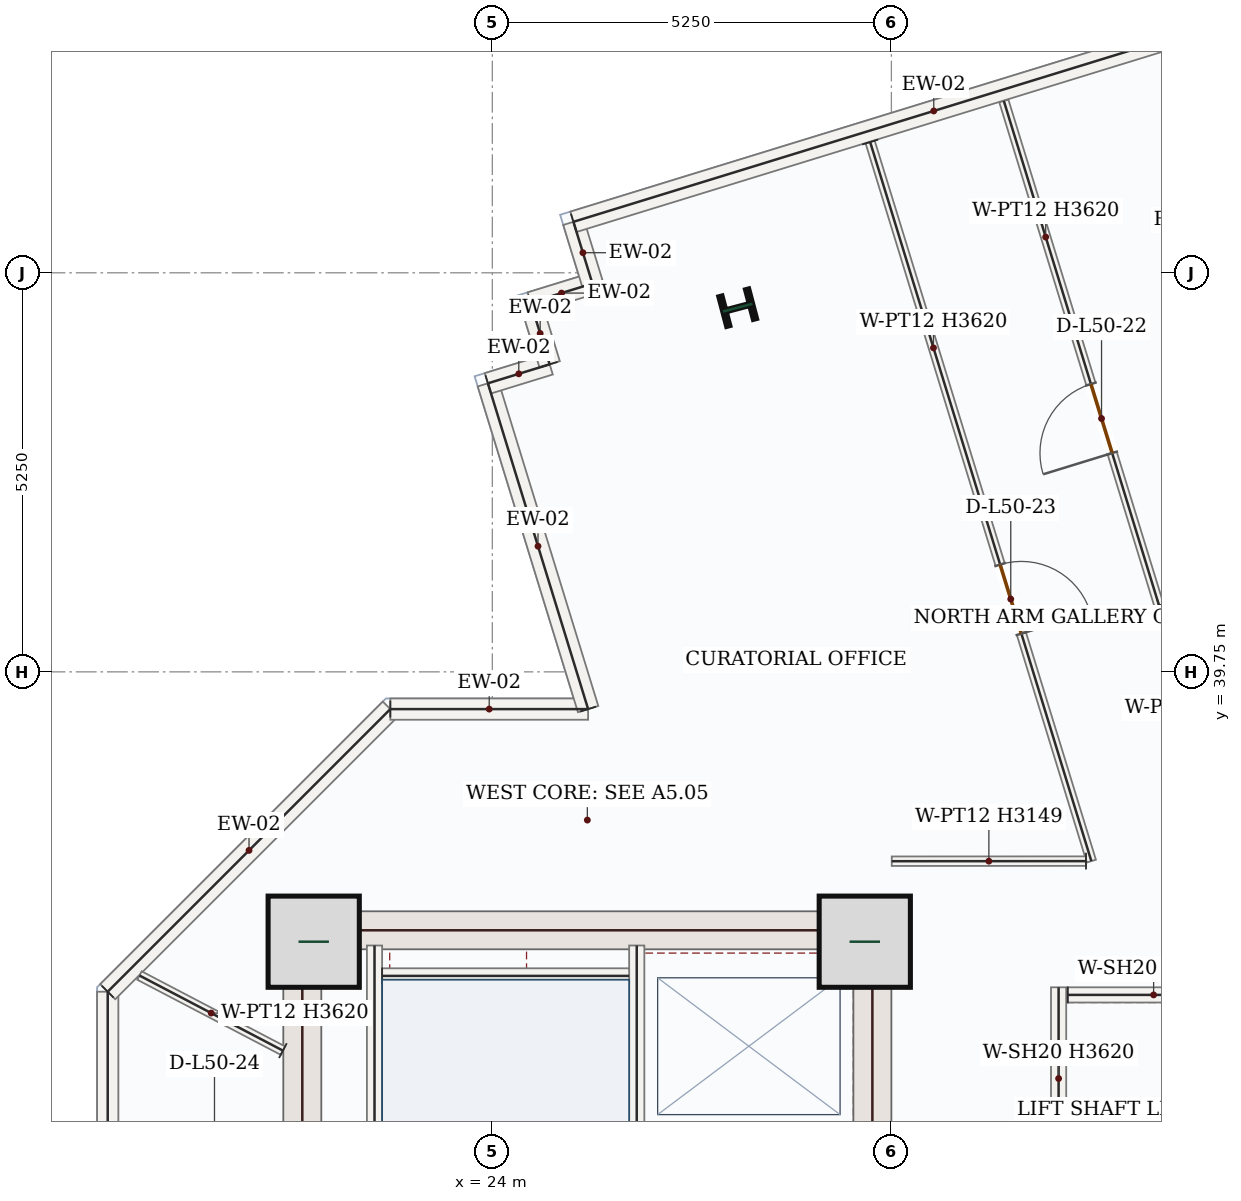
"""IFC4 building model, lengths in metres.
Left out: names, types, materials, properties, quantities, classifications, styles, units other than length and angle.
Written with IfcOpenShell. Run it as: python <this file> out.ifc"""

import sys

from ifc_helpers import new_model, si_unit, direction, frame, frame_2d, origin, origin_2d, place, context, subcontext, project, spatial, rectangle, i_section, extrude, source, transform, mapped, element, fill, save


model = new_model("IFC4")
c1 = context("Model", 3, precision=1e-05, world=origin(), true_north=direction((0.0, 1.0)))
c2 = subcontext(c1, "Body", "Model", "MODEL_VIEW")
j1 = project(units=[si_unit("LENGTHUNIT", "METRE"), si_unit("PLANEANGLEUNIT", "RADIAN")], contexts=[c1])
p1 = place(None, origin())
s1 = spatial("IfcSite", under=j1, at=p1, CompositionType="ELEMENT")
p2 = place(p1, origin())
s2 = spatial("IfcBuilding", under=s1, at=p2, CompositionType="ELEMENT")
p3 = place(p2, frame((0.0, 0.0, 213.6)))
s3 = spatial("IfcBuildingStorey", under=s2, at=p3, CompositionType="ELEMENT", Elevation=213.6)
m1 = source(origin(), c2, "Body", "SweptSolid", [
    extrude(rectangle(XDim=8.55, YDim=0.5, at=frame_2d((4.275, 0.0))), origin(), (0.0, 0.0, 1.0), 3.62),
])
p4 = place(p3, frame((21.5, 28.05, 0.0), z_axis=(0.0, 0.0, 1.0), x_axis=(0.0, 1.0, 0.0)))
e1 = element("IfcWall", 1, at=p4, inside=s3, PredefinedType="SHEAR", context=c2, shape_type="MappedRepresentation", body=[
    mapped(m1, transform((0.0, 0.0, 0.0), x_axis=(1.0, 0.0, 0.0), y_axis=(0.0, 1.0, 0.0), z_axis=(0.0, 0.0, 1.0), scale=1.0)),
])
p5 = place(p3, frame((29.0, 28.05, 0.0), z_axis=(0.0, 0.0, 1.0), x_axis=(0.0, 1.0, 0.0)))
e2 = element("IfcWall", 2, at=p5, inside=s3, PredefinedType="SHEAR", context=c2, shape_type="SweptSolid", body=[
    extrude(rectangle(XDim=8.55, YDim=0.5, at=frame_2d((4.275, 0.0))), origin(), (0.0, 0.0, 1.0), 3.62),
])
p6 = place(p5, frame((1.5, 0.0, 0.0)))
e3 = element("IfcOpeningElement", 3, at=p6, cuts=e2, PredefinedType="OPENING", context=c2, shape_type="SweptSolid", body=[
    extrude(rectangle(XDim=1.1, YDim=2.2, at=frame_2d((0.55, 1.1))), frame((0.0, 0.26, 0.0), z_axis=(0.0, -1.0, 0.0), x_axis=(1.0, 0.0, 0.0)), (0.0, 0.0, 1.0), 0.52),
])
m2 = source(origin(), c2, "Body", "SweptSolid", [
    extrude(rectangle(XDim=7.0, YDim=0.5, at=frame_2d((3.5, 0.0))), origin(), (0.0, 0.0, 1.0), 3.62),
])
p7 = place(p3, frame((21.75, 36.35, 0.0), z_axis=(0.0, 0.0, 1.0), x_axis=(1.0, 0.0, 0.0)))
e4 = element("IfcWall", 4, at=p7, inside=s3, PredefinedType="SHEAR", context=c2, shape_type="MappedRepresentation", body=[
    mapped(m2, transform((0.0, 0.0, 0.0), x_axis=(1.0, 0.0, 0.0), y_axis=(0.0, 1.0, 0.0), z_axis=(0.0, 0.0, 1.0), scale=1.0)),
])
m3 = source(origin(), c2, "Body", "SweptSolid", [
    extrude(rectangle(XDim=1.2, YDim=1.2, at=origin_2d()), origin(), (0.0, 0.0, 1.0), 3.9),
])
for number, where, z_axis, x_axis in (
    (5, (21.65, 36.2, 0.0), (0.0, 0.0, 1.0), (1.0, 0.0, 0.0)),
    (6, (28.9, 36.2, 0.0), (0.0, 0.0, 1.0), (1.0, 0.0, 0.0)),
):
    element("IfcColumn", number, at=place(p3, frame(where, z_axis=z_axis, x_axis=x_axis)), inside=s3, PredefinedType="COLUMN", context=c2, shape_type="MappedRepresentation", body=[
        mapped(m3, transform((0.0, 0.0, 0.0), x_axis=(1.0, 0.0, 0.0), y_axis=(0.0, 1.0, 0.0), z_axis=(0.0, 0.0, 1.0), scale=1.0)),
    ])
m4 = source(origin(), c2, "Body", "SweptSolid", [
    extrude(i_section(OverallWidth=0.404, OverallDepth=0.407, WebThickness=0.027, FlangeThickness=0.044, FilletRadius=0.018, at=origin_2d()), origin(), (0.0, 0.0, 1.0), 3.9),
])
p8 = place(p3, frame((27.228, 44.541, 0.0), z_axis=(0.0, 0.0, 1.0), x_axis=(-0.255445757936, 0.966823388604, 0.0)))
e7 = element("IfcColumn", 7, at=p8, inside=s3, PredefinedType="COLUMN", context=c2, shape_type="MappedRepresentation", body=[
    mapped(m4, transform((0.0, 0.0, 0.0), x_axis=(1.0, 0.0, 0.0), y_axis=(0.0, 1.0, 0.0), z_axis=(0.0, 0.0, 1.0), scale=1.0)),
])
m5 = source(origin(), c2, "Body", "SweptSolid", [
    extrude(rectangle(XDim=6.822, YDim=0.28, at=frame_2d((3.411, 0.0))), origin(), (0.0, 0.0, 1.0), 3.62),
])
p9 = place(p3, frame((18.94, 28.72, 0.0), z_axis=(0.0, 0.0, 1.0), x_axis=(0.0, 1.0, 0.0)))
e8 = element("IfcWall", 8, at=p9, inside=s3, PredefinedType="SOLIDWALL", context=c2, shape_type="MappedRepresentation", body=[
    mapped(m5, transform((0.0, 0.0, 0.0), x_axis=(1.0, 0.0, 0.0), y_axis=(0.0, 1.0, 0.0), z_axis=(0.0, 0.0, 1.0), scale=1.0)),
])
m6 = source(origin(), c2, "Body", "SweptSolid", [
    extrude(rectangle(XDim=5.258, YDim=0.28, at=frame_2d((2.629, 0.0))), origin(), (0.0, 0.0, 1.0), 3.62),
])
p10 = place(p3, frame((18.94, 35.542, 0.0), z_axis=(0.0, 0.0, 1.0), x_axis=(0.707106781187, 0.707106781187, 0.0)))
e9 = element("IfcWall", 9, at=p10, inside=s3, PredefinedType="SOLIDWALL", context=c2, shape_type="MappedRepresentation", body=[
    mapped(m6, transform((0.0, 0.0, 0.0), x_axis=(1.0, 0.0, 0.0), y_axis=(0.0, 1.0, 0.0), z_axis=(0.0, 0.0, 1.0), scale=1.0)),
])
m7 = source(origin(), c2, "Body", "SweptSolid", [
    extrude(rectangle(XDim=2.602, YDim=0.28, at=frame_2d((1.301, 0.0))), origin(), (0.0, 0.0, 1.0), 3.62),
])
p11 = place(p3, frame((22.658, 39.26, 0.0), z_axis=(0.0, 0.0, 1.0), x_axis=(1.0, 0.0, 0.0)))
e10 = element("IfcWall", 10, at=p11, inside=s3, PredefinedType="SOLIDWALL", context=c2, shape_type="MappedRepresentation", body=[
    mapped(m7, transform((0.0, 0.0, 0.0), x_axis=(1.0, 0.0, 0.0), y_axis=(0.0, 1.0, 0.0), z_axis=(0.0, 0.0, 1.0), scale=1.0)),
])
m8 = source(origin(), c2, "Body", "SweptSolid", [
    extrude(rectangle(XDim=4.484, YDim=0.28, at=frame_2d((2.242, 0.0))), origin(), (0.0, 0.0, 1.0), 3.62),
])
p12 = place(p3, frame((25.26, 39.26, 0.0), z_axis=(0.0, 0.0, 1.0), x_axis=(-0.294009328951, 0.95580254995, 0.0)))
e11 = element("IfcWall", 11, at=p12, inside=s3, PredefinedType="SOLIDWALL", context=c2, shape_type="MappedRepresentation", body=[
    mapped(m8, transform((0.0, 0.0, 0.0), x_axis=(1.0, 0.0, 0.0), y_axis=(0.0, 1.0, 0.0), z_axis=(0.0, 0.0, 1.0), scale=1.0)),
])
m9 = source(origin(), c2, "Body", "SweptSolid", [
    extrude(rectangle(XDim=0.85, YDim=0.28, at=frame_2d((0.425, 0.0))), origin(), (0.0, 0.0, 1.0), 3.62),
])
p13 = place(p3, frame((23.942, 43.546, 0.0), z_axis=(0.0, 0.0, 1.0), x_axis=(0.955834897765, 0.293904148005, 0.0)))
e12 = element("IfcWall", 12, at=p13, inside=s3, PredefinedType="SOLIDWALL", context=c2, shape_type="MappedRepresentation", body=[
    mapped(m9, transform((0.0, 0.0, 0.0), x_axis=(1.0, 0.0, 0.0), y_axis=(0.0, 1.0, 0.0), z_axis=(0.0, 0.0, 1.0), scale=1.0)),
])
m10 = source(origin(), c2, "Body", "SweptSolid", [
    extrude(rectangle(XDim=0.85, YDim=0.28, at=frame_2d((0.425, 0.0))), origin(), (0.0, 0.0, 1.0), 3.62),
])
p14 = place(p3, frame((24.754, 43.796, 0.0), z_axis=(0.0, 0.0, 1.0), x_axis=(-0.293823460726, 0.955859704102, 0.0)))
e13 = element("IfcWall", 13, at=p14, inside=s3, PredefinedType="SOLIDWALL", context=c2, shape_type="MappedRepresentation", body=[
    mapped(m10, transform((0.0, 0.0, 0.0), x_axis=(1.0, 0.0, 0.0), y_axis=(0.0, 1.0, 0.0), z_axis=(0.0, 0.0, 1.0), scale=1.0)),
])
p15 = place(p3, frame((24.504, 44.608, 0.0), z_axis=(0.0, 0.0, 1.0), x_axis=(0.95575416016, 0.294166594531, 0.0)))
e14 = element("IfcWall", 14, at=p15, inside=s3, PredefinedType="SOLIDWALL", context=c2, shape_type="MappedRepresentation", body=[
    mapped(m9, transform((0.0, 0.0, 0.0), x_axis=(1.0, 0.0, 0.0), y_axis=(0.0, 1.0, 0.0), z_axis=(0.0, 0.0, 1.0), scale=1.0)),
])
p16 = place(p3, frame((25.317, 44.858, 0.0), z_axis=(0.0, 0.0, 1.0), x_axis=(-0.293823460726, 0.955859704102, 0.0)))
e15 = element("IfcWall", 15, at=p16, inside=s3, PredefinedType="SOLIDWALL", context=c2, shape_type="MappedRepresentation", body=[
    mapped(m10, transform((0.0, 0.0, 0.0), x_axis=(1.0, 0.0, 0.0), y_axis=(0.0, 1.0, 0.0), z_axis=(0.0, 0.0, 1.0), scale=1.0)),
])
m11 = source(origin(), c2, "Body", "SweptSolid", [
    extrude(rectangle(XDim=9.92, YDim=0.28, at=frame_2d((4.96, 0.0))), origin(), (0.0, 0.0, 1.0), 3.62),
])
p17 = place(p3, frame((25.067, 45.671, 0.0), z_axis=(0.0, 0.0, 1.0), x_axis=(0.955796567368, 0.294028777175, 0.0)))
e16 = element("IfcWall", 16, at=p17, inside=s3, PredefinedType="SOLIDWALL", context=c2, shape_type="MappedRepresentation", body=[
    mapped(m11, transform((0.0, 0.0, 0.0), x_axis=(1.0, 0.0, 0.0), y_axis=(0.0, 1.0, 0.0), z_axis=(0.0, 0.0, 1.0), scale=1.0)),
])
m12 = source(origin(), c2, "Body", "SweptSolid", [
    extrude(rectangle(XDim=7.87, YDim=0.2, at=frame_2d((3.935, 0.0))), origin(), (0.0, 0.0, 1.0), 3.62),
])
p18 = place(p3, frame((22.45, 28.28, 0.0), z_axis=(0.0, 0.0, 1.0), x_axis=(0.0, 1.0, 0.0)))
e17 = element("IfcWall", 17, at=p18, inside=s3, PredefinedType="SOLIDWALL", context=c2, shape_type="MappedRepresentation", body=[
    mapped(m12, transform((0.0, 0.0, 0.0), x_axis=(1.0, 0.0, 0.0), y_axis=(0.0, 1.0, 0.0), z_axis=(0.0, 0.0, 1.0), scale=1.0)),
])
p19 = place(p3, frame((25.9, 28.15, 0.0), z_axis=(0.0, 0.0, 1.0), x_axis=(0.0, 1.0, 0.0)))
e18 = element("IfcWall", 18, at=p19, inside=s3, PredefinedType="SOLIDWALL", context=c2, shape_type="SweptSolid", body=[
    extrude(rectangle(XDim=8.0, YDim=0.2, at=frame_2d((4.0, 0.0))), origin(), (0.0, 0.0, 1.0), 3.62),
])
p20 = place(p19, frame((0.4, 0.0, 0.0)))
e19 = element("IfcOpeningElement", 19, at=p20, cuts=e18, PredefinedType="OPENING", context=c2, shape_type="SweptSolid", body=[
    extrude(rectangle(XDim=1.05, YDim=2.15, at=frame_2d((0.525, 1.075))), frame((0.0, 0.11, 0.0), z_axis=(0.0, -1.0, 0.0), x_axis=(1.0, 0.0, 0.0)), (0.0, 0.0, 1.0), 0.22),
])
m13 = source(origin(), c2, "Body", "SweptSolid", [
    extrude(rectangle(XDim=3.25, YDim=0.2, at=frame_2d((1.625, 0.0))), origin(), (0.0, 0.0, 1.0), 3.62),
])
p21 = place(p3, frame((22.55, 35.75, 0.0), z_axis=(0.0, 0.0, 1.0), x_axis=(1.0, 0.0, 0.0)))
e20 = element("IfcWall", 20, at=p21, inside=s3, PredefinedType="SOLIDWALL", context=c2, shape_type="MappedRepresentation", body=[
    mapped(m13, transform((0.0, 0.0, 0.0), x_axis=(1.0, 0.0, 0.0), y_axis=(0.0, 1.0, 0.0), z_axis=(0.0, 0.0, 1.0), scale=1.0)),
])
m14 = source(origin(), c2, "Body", "SweptSolid", [
    extrude(rectangle(XDim=2.4, YDim=0.2, at=frame_2d((1.2, 0.0))), origin(), (0.0, 0.0, 1.0), 3.62),
])
p22 = place(p3, frame((31.45, 33.2, 0.0), z_axis=(0.0, 0.0, 1.0), x_axis=(0.0, 1.0, 0.0)))
e21 = element("IfcWall", 21, at=p22, inside=s3, PredefinedType="SOLIDWALL", context=c2, shape_type="MappedRepresentation", body=[
    mapped(m14, transform((0.0, 0.0, 0.0), x_axis=(1.0, 0.0, 0.0), y_axis=(0.0, 1.0, 0.0), z_axis=(0.0, 0.0, 1.0), scale=1.0)),
])
m15 = source(origin(), c2, "Body", "SweptSolid", [
    extrude(rectangle(XDim=2.26, YDim=0.2, at=frame_2d((1.13, 0.0))), origin(), (0.0, 0.0, 1.0), 3.62),
])
p23 = place(p3, frame((31.57, 35.5, 0.0), z_axis=(0.0, 0.0, 1.0), x_axis=(1.0, 0.0, 0.0)))
e22 = element("IfcWall", 22, at=p23, inside=s3, PredefinedType="SOLIDWALL", context=c2, shape_type="MappedRepresentation", body=[
    mapped(m15, transform((0.0, 0.0, 0.0), x_axis=(1.0, 0.0, 0.0), y_axis=(0.0, 1.0, 0.0), z_axis=(0.0, 0.0, 1.0), scale=1.0)),
])
m16 = source(origin(), c2, "Body", "SweptSolid", [
    extrude(rectangle(XDim=3.498, YDim=0.125, at=frame_2d((1.749, 0.0))), origin(), (0.0, 0.0, 1.0), 3.62),
])
p24 = place(p3, frame((33.806, 37.26, 0.0), z_axis=(0.0, 0.0, 1.0), x_axis=(-0.294012288782, 0.955801639487, 0.0)))
e23 = element("IfcWall", 23, at=p24, inside=s3, PredefinedType="PARTITIONING", context=c2, shape_type="MappedRepresentation", body=[
    mapped(m16, transform((0.0, 0.0, 0.0), x_axis=(1.0, 0.0, 0.0), y_axis=(0.0, 1.0, 0.0), z_axis=(0.0, 0.0, 1.0), scale=1.0)),
])
m17 = source(origin(), c2, "Body", "SweptSolid", [
    extrude(rectangle(XDim=5.595, YDim=0.125, at=frame_2d((2.797, 0.0))), origin(), (0.0, 0.0, 1.0), 3.62),
])
p25 = place(p3, frame((32.778, 40.604, 0.0), z_axis=(0.0, 0.0, 1.0), x_axis=(0.955787499516, 0.294058252339, 0.0)))
e24 = element("IfcWall", 24, at=p25, inside=s3, PredefinedType="PARTITIONING", context=c2, shape_type="MappedRepresentation", body=[
    mapped(m17, transform((0.0, 0.0, 0.0), x_axis=(1.0, 0.0, 0.0), y_axis=(0.0, 1.0, 0.0), z_axis=(0.0, 0.0, 1.0), scale=1.0)),
])
p26 = place(p3, frame((32.771, 40.623, 0.0), z_axis=(0.0, 0.0, 1.0), x_axis=(-0.294016682873, 0.955800287818, 0.0)))
e25 = element("IfcWall", 25, at=p26, inside=s3, PredefinedType="PARTITIONING", context=c2, shape_type="SweptSolid", body=[
    extrude(rectangle(XDim=6.945, YDim=0.125, at=frame_2d((3.473, 0.0))), origin(), (0.0, 0.0, 1.0), 3.62),
])
p27 = place(p26, frame((2.098, 0.0, 0.0)))
e26 = element("IfcOpeningElement", 26, at=p27, cuts=e25, PredefinedType="OPENING", context=c2, shape_type="SweptSolid", body=[
    extrude(rectangle(XDim=0.95, YDim=2.15, at=frame_2d((0.475, 1.075))), frame((0.0, 0.073, 0.0), z_axis=(0.0, -1.0, 0.0), x_axis=(1.0, 0.0, 0.0)), (0.0, 0.0, 1.0), 0.145),
])
p28 = place(p3, frame((28.971, 46.72, 0.0), z_axis=(0.0, 0.0, 1.0), x_axis=(0.294052915152, -0.955789141542, 0.0)))
e27 = element("IfcWall", 27, at=p28, inside=s3, PredefinedType="PARTITIONING", context=c2, shape_type="SweptSolid", body=[
    extrude(rectangle(XDim=9.897, YDim=0.125, at=frame_2d((4.949, 0.0))), origin(), (0.0, 0.0, 1.0), 3.62),
])
p29 = place(p28, frame((5.816, 0.0, 0.0)))
e28 = element("IfcOpeningElement", 28, at=p29, cuts=e27, PredefinedType="OPENING", context=c2, shape_type="SweptSolid", body=[
    extrude(rectangle(XDim=0.95, YDim=2.15, at=frame_2d((0.475, 1.075))), frame((0.0, 0.073, 0.0), z_axis=(0.0, -1.0, 0.0), x_axis=(1.0, 0.0, 0.0)), (0.0, 0.0, 1.0), 0.145),
])
m18 = source(origin(), c2, "Body", "SweptSolid", [
    extrude(rectangle(XDim=2.555, YDim=0.125, at=frame_2d((1.278, 0.0))), origin(), (0.0, 0.0, 1.0), 3.149),
])
p30 = place(p3, frame((31.81, 37.26, 0.0), z_axis=(0.0, 0.0, 1.0), x_axis=(-0.999999885905, -0.000477691739, 0.0)))
e29 = element("IfcWall", 29, at=p30, inside=s3, PredefinedType="PARTITIONING", context=c2, shape_type="MappedRepresentation", body=[
    mapped(m18, transform((0.0, 0.0, 0.0), x_axis=(1.0, 0.0, 0.0), y_axis=(0.0, 1.0, 0.0), z_axis=(0.0, 0.0, 1.0), scale=1.0)),
])
m19 = source(origin(), c2, "Body", "SweptSolid", [
    extrude(rectangle(XDim=2.13, YDim=0.125, at=frame_2d((1.065, 0.0))), origin(), (0.0, 0.0, 1.0), 3.62),
])
p31 = place(p3, frame((21.245, 34.767, 0.0), z_axis=(0.0, 0.0, 1.0), x_axis=(-0.885975067717, 0.46373287503, 0.0)))
e30 = element("IfcWall", 30, at=p31, inside=s3, PredefinedType="PARTITIONING", context=c2, shape_type="MappedRepresentation", body=[
    mapped(m19, transform((0.0, 0.0, 0.0), x_axis=(1.0, 0.0, 0.0), y_axis=(0.0, 1.0, 0.0), z_axis=(0.0, 0.0, 1.0), scale=1.0)),
])
m20 = source(origin(), c2, "Body", "SweptSolid", [
    extrude(rectangle(XDim=0.95, YDim=2.15, at=frame_2d((0.475, 1.075))), frame((0.0, 0.025, 0.0), z_axis=(0.0, -1.0, 0.0), x_axis=(1.0, 0.0, 0.0)), (0.0, 0.0, 1.0), 0.05),
])
p32 = place(p27, origin())
e31 = element("IfcDoor", 31, at=p32, inside=s3, OperationType="SINGLE_SWING_LEFT", PredefinedType="DOOR", context=c2, shape_type="MappedRepresentation", body=[
    mapped(m20, transform((0.0, 0.0, 0.0), x_axis=(1.0, 0.0, 0.0), y_axis=(0.0, 1.0, 0.0), z_axis=(0.0, 0.0, 1.0), scale=1.0)),
])
fill(e26, e31)
p33 = place(p29, origin())
e32 = element("IfcDoor", 32, at=p33, inside=s3, OperationType="SINGLE_SWING_RIGHT", PredefinedType="DOOR", context=c2, shape_type="MappedRepresentation", body=[
    mapped(m20, transform((0.0, 0.0, 0.0), x_axis=(1.0, 0.0, 0.0), y_axis=(0.0, 1.0, 0.0), z_axis=(0.0, 0.0, 1.0), scale=1.0)),
])
fill(e28, e32)
save(model, sys.argv[1])
